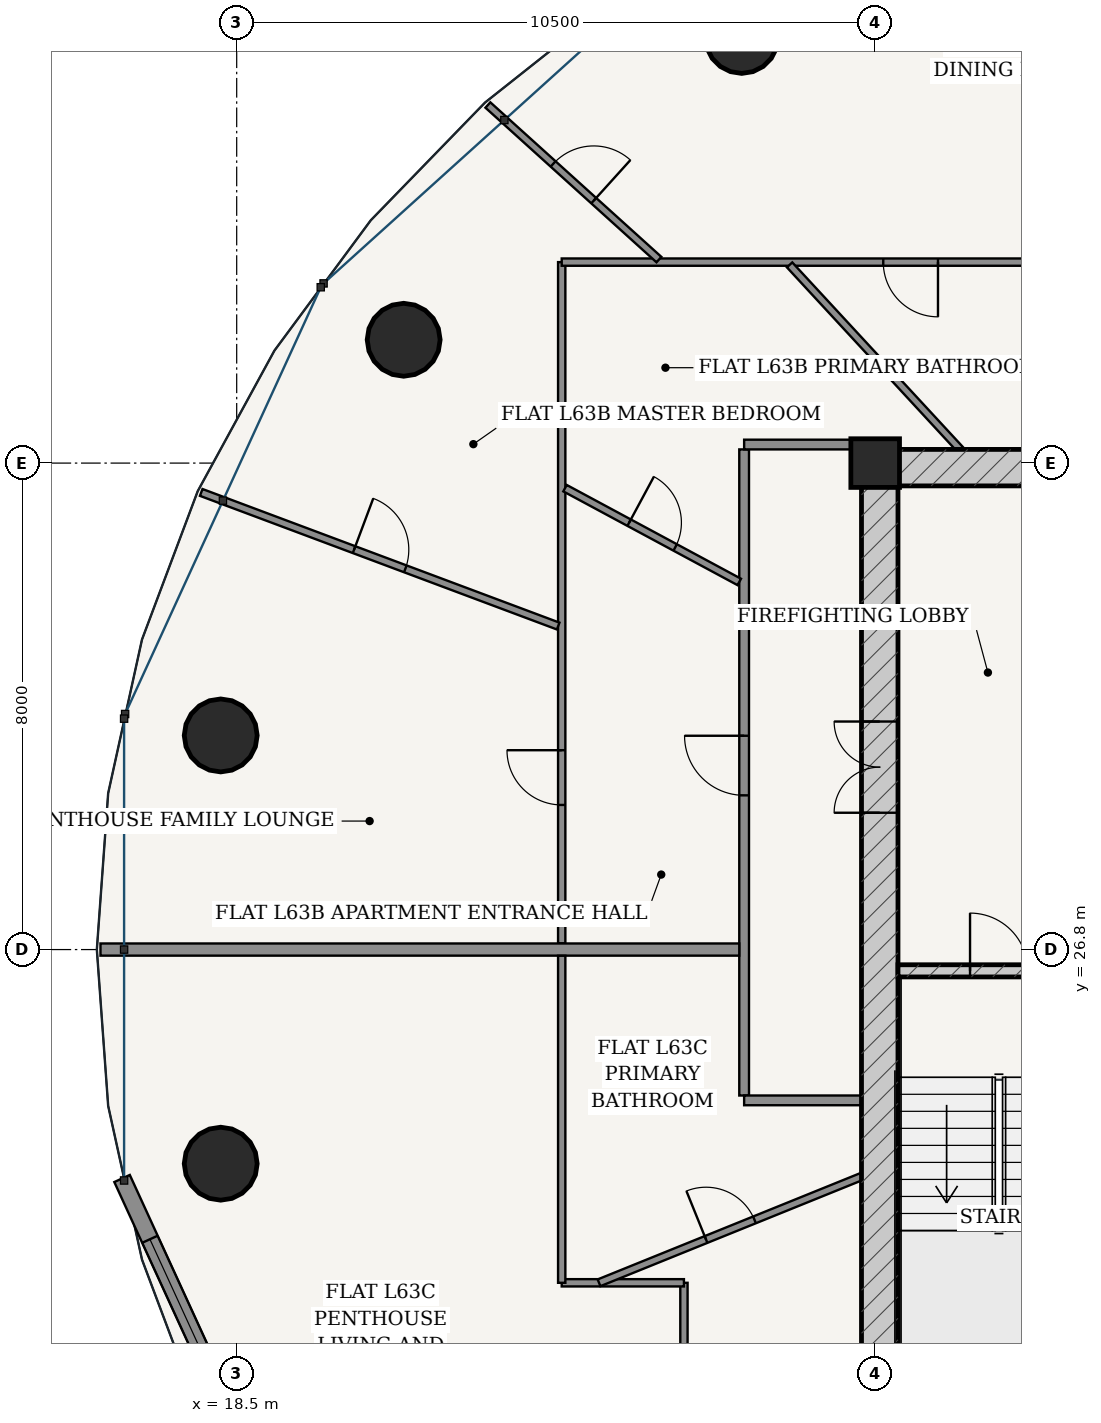
"""IFC4 building model, lengths in metres.
Left out: names, types, materials, properties, quantities, classifications, styles, units other than length and angle.
Written with IfcOpenShell. Run it as: python <this file> out.ifc"""

import sys

from ifc_helpers import new_model, si_unit, direction, frame, frame_2d, origin, origin_2d, place, context, subcontext, project, spatial, rectangle, hollow_circle, extrude, source, transform, mapped, element, fill, save


model = new_model("IFC4")
c1 = context("Model", 3, precision=1e-05, world=origin(), true_north=direction((-0.2419218956, 0.970295726276)))
c2 = subcontext(c1, "Body", "Model", "MODEL_VIEW")
j1 = project(units=[si_unit("LENGTHUNIT", "METRE"), si_unit("PLANEANGLEUNIT", "RADIAN")], contexts=[c1])
p1 = place(None, origin())
s1 = spatial("IfcSite", under=j1, at=p1, CompositionType="ELEMENT")
p2 = place(p1, origin())
s2 = spatial("IfcBuilding", under=s1, at=p2, CompositionType="ELEMENT")
p3 = place(p2, frame((0.0, 0.0, 239.3)))
s3 = spatial("IfcBuildingStorey", under=s2, at=p3, CompositionType="ELEMENT", Elevation=239.3)
p4 = place(p3, frame((29.0, 34.8, 0.0), z_axis=(0.0, 0.0, 1.0), x_axis=(1.0, 0.0, 0.0)))
e1 = element("IfcColumn", 1, at=p4, inside=s3, PredefinedType="COLUMN", context=c2, shape_type="SweptSolid", body=[
    extrude(rectangle(XDim=0.8, YDim=0.8, at=origin_2d()), origin(), (0.0, 0.0, 1.0), 3.7),
])
p5 = place(p3, frame((28.775, 34.725, 0.0), z_axis=(0.0, 0.0, 1.0), x_axis=(1.0, 0.0, 0.0)))
e2 = element("IfcWall", 2, at=p5, inside=s3, PredefinedType="SHEAR", context=c2, shape_type="SweptSolid", body=[
    extrude(rectangle(XDim=18.45, YDim=0.6, at=frame_2d((9.225, 0.0))), origin(), (0.0, 0.0, 1.0), 3.25),
])
p6 = place(p3, frame((29.075, 19.175, 0.0), z_axis=(0.0, 0.0, 1.0), x_axis=(0.0, 1.0, 0.0)))
e3 = element("IfcWall", 3, at=p6, inside=s3, PredefinedType="SHEAR", context=c2, shape_type="SweptSolid", body=[
    extrude(rectangle(XDim=15.25, YDim=0.6, at=frame_2d((7.625, 0.0))), origin(), (0.0, 0.0, 1.0), 3.25),
])
p7 = place(p6, frame((9.875, 0.0, 0.0)))
e4 = element("IfcOpeningElement", 4, at=p7, cuts=e3, PredefinedType="OPENING", context=c2, shape_type="SweptSolid", body=[
    extrude(rectangle(XDim=1.5, YDim=2.2, at=frame_2d((0.75, 1.1))), frame((0.0, 0.31, 0.0), z_axis=(0.0, -1.0, 0.0), x_axis=(1.0, 0.0, 0.0)), (0.0, 0.0, 1.0), 0.62),
])
p8 = place(p3, frame((29.375, 26.45, 0.0), z_axis=(0.0, 0.0, 1.0), x_axis=(1.0, 0.0, 0.0)))
e5 = element("IfcWall", 5, at=p8, inside=s3, PredefinedType="SOLIDWALL", context=c2, shape_type="SweptSolid", body=[
    extrude(rectangle(XDim=3.32, YDim=0.2, at=frame_2d((1.66, 0.0))), origin(), (0.0, 0.0, 1.0), 3.25),
])
p9 = place(p8, frame((1.185, 0.0, 0.0)))
e6 = element("IfcOpeningElement", 6, at=p9, cuts=e5, PredefinedType="OPENING", context=c2, shape_type="SweptSolid", body=[
    extrude(rectangle(XDim=0.95, YDim=2.15, at=frame_2d((0.475, 1.075))), frame((0.0, 0.11, 0.0), z_axis=(0.0, -1.0, 0.0), x_axis=(1.0, 0.0, 0.0)), (0.0, 0.0, 1.0), 0.22),
])
for number, where, z_axis, x_axis in (
    (7, (26.805, 41.808, 0.0), (0.0, 0.0, 1.0), (1.0, 0.0, 0.0)),
    (8, (21.246, 36.828, 0.0), (0.0, 0.0, 1.0), (1.0, 0.0, 0.0)),
    (9, (18.237, 30.321, 0.0), (0.0, 0.0, 1.0), (1.0, 0.0, 0.0)),
    (10, (18.237, 23.279, 0.0), (0.0, 0.0, 1.0), (1.0, 0.0, 0.0)),
):
    element("IfcColumn", number, at=place(p3, frame(where, z_axis=z_axis, x_axis=x_axis)), inside=s3, PredefinedType="COLUMN", context=c2, shape_type="SweptSolid", body=[
        extrude(hollow_circle(Radius=0.6, WallThickness=0.038, at=origin_2d()), origin(), (0.0, 0.0, 1.0), 3.7),
    ])
p10 = place(p3, frame((16.615, 23.035, 0.0), z_axis=(0.0, 0.0, 1.0), x_axis=(0.416717018135, -0.909036262641, 0.0)))
e11 = element("IfcWall", 11, at=p10, inside=s3, PredefinedType="SOLIDWALL", context=c2, shape_type="SweptSolid", body=[
    extrude(rectangle(XDim=7.96, YDim=0.28, at=frame_2d((3.98, 0.0))), origin(), (0.0, 0.0, 1.0), 3.25),
])
p11 = place(p10, frame((1.099, 0.0, 0.85)))
e12 = element("IfcOpeningElement", 12, at=p11, cuts=e11, PredefinedType="OPENING", context=c2, shape_type="SweptSolid", body=[
    extrude(rectangle(XDim=2.1, YDim=1.95, at=frame_2d((1.05, 0.975))), frame((0.0, 0.15, 0.0), z_axis=(0.0, -1.0, 0.0), x_axis=(1.0, 0.0, 0.0)), (0.0, 0.0, 1.0), 0.3),
])
p12 = place(p10, frame((4.761, 0.0, 0.85)))
e13 = element("IfcOpeningElement", 13, at=p12, cuts=e11, PredefinedType="OPENING", context=c2, shape_type="SweptSolid", body=[
    extrude(rectangle(XDim=2.1, YDim=1.95, at=frame_2d((1.05, 0.975))), frame((0.0, 0.15, 0.0), z_axis=(0.0, -1.0, 0.0), x_axis=(1.0, 0.0, 0.0)), (0.0, 0.0, 1.0), 0.3),
])
p13 = place(p3, frame((26.845, 24.4, 0.0), z_axis=(0.0, 0.0, 1.0), x_axis=(0.0, 1.0, 0.0)))
e14 = element("IfcWall", 14, at=p13, inside=s3, PredefinedType="PARTITIONING", context=c2, shape_type="SweptSolid", body=[
    extrude(rectangle(XDim=10.625, YDim=0.16, at=frame_2d((5.312, 0.0))), origin(), (0.0, 0.0, 1.0), 2.775),
])
p14 = place(p13, frame((4.936, 0.0, 0.0)))
e15 = element("IfcOpeningElement", 15, at=p14, cuts=e14, PredefinedType="OPENING", context=c2, shape_type="SweptSolid", body=[
    extrude(rectangle(XDim=0.98, YDim=2.2, at=frame_2d((0.49, 1.1))), frame((0.0, 0.09, 0.0), z_axis=(0.0, -1.0, 0.0), x_axis=(1.0, 0.0, 0.0)), (0.0, 0.0, 1.0), 0.18),
])
for number, where, z_axis, x_axis in (
    (16, (26.845, 35.105, 0.0), (0.0, 0.0, 1.0), (1.0, 0.0, 0.0)),
    (17, (26.845, 24.32, 0.0), (0.0, 0.0, 1.0), (1.0, 0.0, 0.0)),
):
    element("IfcWall", number, at=place(p3, frame(where, z_axis=z_axis, x_axis=x_axis)), inside=s3, PredefinedType="PARTITIONING", context=c2, shape_type="SweptSolid", body=[
        extrude(rectangle(XDim=1.93, YDim=0.16, at=frame_2d((0.965, 0.0))), origin(), (0.0, 0.0, 1.0), 3.25),
    ])
p15 = place(p3, frame((23.845, 26.902, 0.0), z_axis=(0.0, 0.0, 1.0), x_axis=(0.0, 1.0, 0.0)))
e18 = element("IfcWall", 18, at=p15, inside=s3, PredefinedType="PARTITIONING", context=c2, shape_type="SweptSolid", body=[
    extrude(rectangle(XDim=11.203, YDim=0.12, at=frame_2d((5.602, 0.0))), origin(), (0.0, 0.0, 1.0), 2.775),
])
p16 = place(p15, frame((2.276, 0.0, 0.0)))
e19 = element("IfcOpeningElement", 19, at=p16, cuts=e18, PredefinedType="OPENING", context=c2, shape_type="SweptSolid", body=[
    extrude(rectangle(XDim=0.9, YDim=2.15, at=frame_2d((0.45, 1.075))), frame((0.0, 0.07, 0.0), z_axis=(0.0, -1.0, 0.0), x_axis=(1.0, 0.0, 0.0)), (0.0, 0.0, 1.0), 0.14),
])
p17 = place(p3, frame((23.845, 38.105, 0.0), z_axis=(0.0, 0.0, 1.0), x_axis=(1.0, 0.0, 0.0)))
e20 = element("IfcWall", 20, at=p17, inside=s3, PredefinedType="PARTITIONING", context=c2, shape_type="SweptSolid", body=[
    extrude(rectangle(XDim=8.01, YDim=0.12, at=frame_2d((4.005, 0.0))), origin(), (0.0, 0.0, 1.0), 2.775),
])
p18 = place(p17, frame((5.288, 0.0, 0.0)))
e21 = element("IfcOpeningElement", 21, at=p18, cuts=e20, PredefinedType="OPENING", context=c2, shape_type="SweptSolid", body=[
    extrude(rectangle(XDim=0.9, YDim=2.15, at=frame_2d((0.45, 1.075))), frame((0.0, 0.07, 0.0), z_axis=(0.0, -1.0, 0.0), x_axis=(1.0, 0.0, 0.0)), (0.0, 0.0, 1.0), 0.14),
])
p19 = place(p3, frame((25.444, 38.146, 0.0), z_axis=(0.0, 0.0, 1.0), x_axis=(-0.741941434687, 0.670464695189, 0.0)))
e22 = element("IfcWall", 22, at=p19, inside=s3, PredefinedType="PARTITIONING", context=c2, shape_type="SweptSolid", body=[
    extrude(rectangle(XDim=3.792, YDim=0.12, at=frame_2d((1.896, 0.0))), origin(), (0.0, 0.0, 1.0), 2.881),
])
p20 = place(p19, frame((1.446, 0.0, 0.0)))
e23 = element("IfcOpeningElement", 23, at=p20, cuts=e22, PredefinedType="OPENING", context=c2, shape_type="SweptSolid", body=[
    extrude(rectangle(XDim=0.9, YDim=2.15, at=frame_2d((0.45, 1.075))), frame((0.0, 0.07, 0.0), z_axis=(0.0, -1.0, 0.0), x_axis=(1.0, 0.0, 0.0)), (0.0, 0.0, 1.0), 0.14),
])
p21 = place(p3, frame((23.787, 32.12, 0.0), z_axis=(0.0, 0.0, 1.0), x_axis=(-0.936540304423, 0.35055992097, 0.0)))
e24 = element("IfcWall", 24, at=p21, inside=s3, PredefinedType="PARTITIONING", context=c2, shape_type="SweptSolid", body=[
    extrude(rectangle(XDim=6.268, YDim=0.12, at=frame_2d((3.134, 0.0))), origin(), (0.0, 0.0, 1.0), 2.881),
])
p22 = place(p21, frame((2.684, 0.0, 0.0)))
e25 = element("IfcOpeningElement", 25, at=p22, cuts=e24, PredefinedType="OPENING", context=c2, shape_type="SweptSolid", body=[
    extrude(rectangle(XDim=0.9, YDim=2.15, at=frame_2d((0.45, 1.075))), frame((0.0, 0.07, 0.0), z_axis=(0.0, -1.0, 0.0), x_axis=(1.0, 0.0, 0.0)), (0.0, 0.0, 1.0), 0.14),
])
p23 = place(p3, frame((30.396, 35.026, 0.0), z_axis=(0.0, 0.0, 1.0), x_axis=(-0.678748871003, 0.73437045836, 0.0)))
e26 = element("IfcWall", 26, at=p23, inside=s3, PredefinedType="PARTITIONING", context=c2, shape_type="SweptSolid", body=[
    extrude(rectangle(XDim=4.13, YDim=0.12, at=frame_2d((2.065, 0.0))), origin(), (0.0, 0.0, 1.0), 2.775),
])
p24 = place(p3, frame((26.765, 32.845, 0.0), z_axis=(0.0, 0.0, 1.0), x_axis=(-0.88057708661, 0.473902937886, 0.0)))
e27 = element("IfcWall", 27, at=p24, inside=s3, PredefinedType="PARTITIONING", context=c2, shape_type="SweptSolid", body=[
    extrude(rectangle(XDim=3.254, YDim=0.12, at=frame_2d((1.627, 0.0))), origin(), (0.0, 0.0, 1.0), 2.969),
])
p25 = place(p24, frame((1.197, 0.0, 0.0)))
e28 = element("IfcOpeningElement", 28, at=p25, cuts=e27, PredefinedType="OPENING", context=c2, shape_type="SweptSolid", body=[
    extrude(rectangle(XDim=0.86, YDim=2.15, at=frame_2d((0.43, 1.075))), frame((0.0, 0.07, 0.0), z_axis=(0.0, -1.0, 0.0), x_axis=(1.0, 0.0, 0.0)), (0.0, 0.0, 1.0), 0.14),
])
p26 = place(p3, frame((26.765, 26.8, 0.0), z_axis=(0.0, 0.0, 1.0), x_axis=(-1.0, 0.0, 0.0)))
e29 = element("IfcWall", 29, at=p26, inside=s3, PredefinedType="PARTITIONING", context=c2, shape_type="SweptSolid", body=[
    extrude(rectangle(XDim=10.505, YDim=0.2, at=frame_2d((5.252, 0.0))), origin(), (0.0, 0.0, 1.0), 2.881),
])
p27 = place(p3, frame((25.855, 15.655, 0.0), z_axis=(0.0, 0.0, 1.0), x_axis=(0.0, 1.0, 0.0)))
e30 = element("IfcWall", 30, at=p27, inside=s3, PredefinedType="PARTITIONING", context=c2, shape_type="SweptSolid", body=[
    extrude(rectangle(XDim=5.665, YDim=0.12, at=frame_2d((2.833, 0.0))), origin(), (0.0, 0.0, 1.0), 2.775),
])
p28 = place(p27, frame((2.383, 0.0, 0.0)))
e31 = element("IfcOpeningElement", 31, at=p28, cuts=e30, PredefinedType="OPENING", context=c2, shape_type="SweptSolid", body=[
    extrude(rectangle(XDim=0.9, YDim=2.15, at=frame_2d((0.45, 1.075))), frame((0.0, 0.07, 0.0), z_axis=(0.0, -1.0, 0.0), x_axis=(1.0, 0.0, 0.0)), (0.0, 0.0, 1.0), 0.14),
])
p29 = place(p3, frame((25.855, 21.32, 0.0), z_axis=(0.0, 0.0, 1.0), x_axis=(-1.0, 0.0, 0.0)))
e32 = element("IfcWall", 32, at=p29, inside=s3, PredefinedType="PARTITIONING", context=c2, shape_type="SweptSolid", body=[
    extrude(rectangle(XDim=2.01, YDim=0.12, at=frame_2d((1.005, 0.0))), origin(), (0.0, 0.0, 1.0), 2.969),
])
p30 = place(p3, frame((23.845, 21.32, 0.0), z_axis=(0.0, 0.0, 1.0), x_axis=(0.0, 1.0, 0.0)))
e33 = element("IfcWall", 33, at=p30, inside=s3, PredefinedType="PARTITIONING", context=c2, shape_type="SweptSolid", body=[
    extrude(rectangle(XDim=5.378, YDim=0.12, at=frame_2d((2.689, 0.0))), origin(), (0.0, 0.0, 1.0), 2.775),
])
p31 = place(p3, frame((28.775, 23.067, 0.0), z_axis=(0.0, 0.0, 1.0), x_axis=(-0.926979373422, -0.375112304851, 0.0)))
e34 = element("IfcWall", 34, at=p31, inside=s3, PredefinedType="PARTITIONING", context=c2, shape_type="SweptSolid", body=[
    extrude(rectangle(XDim=4.656, YDim=0.12, at=frame_2d((2.328, 0.0))), origin(), (0.0, 0.0, 1.0), 2.969),
])
p32 = place(p31, frame((1.898, 0.0, 0.0)))
e35 = element("IfcOpeningElement", 35, at=p32, cuts=e34, PredefinedType="OPENING", context=c2, shape_type="SweptSolid", body=[
    extrude(rectangle(XDim=0.86, YDim=2.15, at=frame_2d((0.43, 1.075))), frame((0.0, 0.07, 0.0), z_axis=(0.0, -1.0, 0.0), x_axis=(1.0, 0.0, 0.0)), (0.0, 0.0, 1.0), 0.14),
])
m1 = source(origin(), c2, "Body", "SweptSolid", [
    extrude(rectangle(XDim=2.1, YDim=1.95, at=frame_2d((1.05, 0.975))), frame((0.0, 0.03, 0.0), z_axis=(0.0, -1.0, 0.0), x_axis=(1.0, 0.0, 0.0)), (0.0, 0.0, 1.0), 0.06),
])
p33 = place(p11, origin())
e36 = element("IfcWindow", 36, at=p33, inside=s3, PartitioningType="SINGLE_PANEL", PredefinedType="WINDOW", context=c2, shape_type="MappedRepresentation", body=[
    mapped(m1, transform((0.0, 0.0, 0.0), scale=1.0)),
])
fill(e12, e36)
m2 = source(origin(), c2, "Body", "SweptSolid", [
    extrude(rectangle(XDim=1.5, YDim=2.2, at=frame_2d((0.75, 1.1))), frame((0.0, 0.025, 0.0), z_axis=(0.0, -1.0, 0.0), x_axis=(1.0, 0.0, 0.0)), (0.0, 0.0, 1.0), 0.05),
])
p34 = place(p7, origin())
e37 = element("IfcDoor", 37, at=p34, inside=s3, OperationType="DOUBLE_DOOR_SINGLE_SWING", PredefinedType="DOOR", context=c2, shape_type="MappedRepresentation", body=[
    mapped(m2, transform((0.0, 0.0, 0.0), scale=1.0)),
])
fill(e4, e37)
m3 = source(origin(), c2, "Body", "SweptSolid", [
    extrude(rectangle(XDim=0.95, YDim=2.15, at=frame_2d((0.475, 1.075))), frame((0.0, 0.025, 0.0), z_axis=(0.0, -1.0, 0.0), x_axis=(1.0, 0.0, 0.0)), (0.0, 0.0, 1.0), 0.05),
])
p35 = place(p9, origin())
e38 = element("IfcDoor", 38, at=p35, inside=s3, OperationType="SINGLE_SWING_LEFT", PredefinedType="DOOR", context=c2, shape_type="MappedRepresentation", body=[
    mapped(m3, transform((0.0, 0.0, 0.0), scale=1.0)),
])
fill(e6, e38)
m4 = source(origin(), c2, "Body", "SweptSolid", [
    extrude(rectangle(XDim=0.98, YDim=2.2, at=frame_2d((0.49, 1.1))), frame((0.0, 0.025, 0.0), z_axis=(0.0, -1.0, 0.0), x_axis=(1.0, 0.0, 0.0)), (0.0, 0.0, 1.0), 0.05),
])
p36 = place(p14, origin())
e39 = element("IfcDoor", 39, at=p36, inside=s3, OperationType="SINGLE_SWING_RIGHT", PredefinedType="DOOR", context=c2, shape_type="MappedRepresentation", body=[
    mapped(m4, transform((0.0, 0.0, 0.0), scale=1.0)),
])
fill(e15, e39)
m5 = source(origin(), c2, "Body", "SweptSolid", [
    extrude(rectangle(XDim=0.86, YDim=2.15, at=frame_2d((0.43, 1.075))), frame((0.0, 0.025, 0.0), z_axis=(0.0, -1.0, 0.0), x_axis=(1.0, 0.0, 0.0)), (0.0, 0.0, 1.0), 0.05),
])
p37 = place(p25, frame((0.86, 0.0, 0.0), z_axis=(0.0, 0.0, 1.0), x_axis=(-1.0, 0.0, 0.0)))
e40 = element("IfcDoor", 40, at=p37, inside=s3, OperationType="SINGLE_SWING_LEFT", PredefinedType="DOOR", context=c2, shape_type="MappedRepresentation", body=[
    mapped(m5, transform((0.0, 0.0, 0.0), scale=1.0)),
])
fill(e28, e40)
m6 = source(origin(), c2, "Body", "SweptSolid", [
    extrude(rectangle(XDim=0.9, YDim=2.15, at=frame_2d((0.45, 1.075))), frame((0.0, 0.025, 0.0), z_axis=(0.0, -1.0, 0.0), x_axis=(1.0, 0.0, 0.0)), (0.0, 0.0, 1.0), 0.05),
])
p38 = place(p16, origin())
e41 = element("IfcDoor", 41, at=p38, inside=s3, OperationType="SINGLE_SWING_RIGHT", PredefinedType="DOOR", context=c2, shape_type="MappedRepresentation", body=[
    mapped(m6, transform((0.0, 0.0, 0.0), scale=1.0)),
])
fill(e19, e41)
p39 = place(p22, frame((0.9, 0.0, 0.0), z_axis=(0.0, 0.0, 1.0), x_axis=(-1.0, 0.0, 0.0)))
e42 = element("IfcDoor", 42, at=p39, inside=s3, OperationType="SINGLE_SWING_LEFT", PredefinedType="DOOR", context=c2, shape_type="MappedRepresentation", body=[
    mapped(m6, transform((0.0, 0.0, 0.0), scale=1.0)),
])
fill(e25, e42)
p40 = place(p20, frame((0.9, 0.0, 0.0), z_axis=(0.0, 0.0, 1.0), x_axis=(-1.0, 0.0, 0.0)))
e43 = element("IfcDoor", 43, at=p40, inside=s3, OperationType="SINGLE_SWING_RIGHT", PredefinedType="DOOR", context=c2, shape_type="MappedRepresentation", body=[
    mapped(m6, transform((0.0, 0.0, 0.0), scale=1.0)),
])
fill(e23, e43)
p41 = place(p18, frame((0.9, 0.0, 0.0), z_axis=(0.0, 0.0, 1.0), x_axis=(-1.0, 0.0, 0.0)))
e44 = element("IfcDoor", 44, at=p41, inside=s3, OperationType="SINGLE_SWING_LEFT", PredefinedType="DOOR", context=c2, shape_type="MappedRepresentation", body=[
    mapped(m6, transform((0.0, 0.0, 0.0), scale=1.0)),
])
fill(e21, e44)
p42 = place(p32, frame((0.86, 0.0, 0.0), z_axis=(0.0, 0.0, 1.0), x_axis=(-1.0, 0.0, 0.0)))
e45 = element("IfcDoor", 45, at=p42, inside=s3, OperationType="SINGLE_SWING_LEFT", PredefinedType="DOOR", context=c2, shape_type="MappedRepresentation", body=[
    mapped(m5, transform((0.0, 0.0, 0.0), scale=1.0)),
])
fill(e35, e45)
save(model, sys.argv[1])
